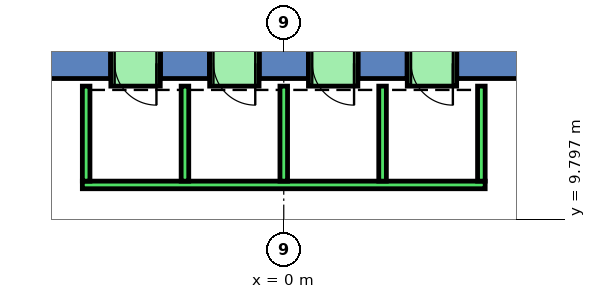
"""IFC4 building model, lengths in metres.
Left out: names, types, materials, properties, quantities, classifications, styles, units other than length and angle.
Written with IfcOpenShell. Run it as: python <this file> out.ifc"""

import sys

from ifc_helpers import new_model, si_unit, direction, frame, frame_2d, origin, place, context, subcontext, project, spatial, polyline, rectangle, outline, extrude, element, fill, save


model = new_model("IFC4")
c1 = context("Model", 3, precision=1e-05, world=origin(), true_north=direction((0.0, 1.0)))
c2 = subcontext(c1, "Body", "Model", "MODEL_VIEW")
j1 = project(units=[si_unit("LENGTHUNIT", "METRE"), si_unit("PLANEANGLEUNIT", "RADIAN")], contexts=[c1])
p1 = place(None, origin())
s1 = spatial("IfcSite", under=j1, at=p1, CompositionType="ELEMENT")
p2 = place(p1, origin())
s2 = spatial("IfcBuilding", under=s1, at=p2, CompositionType="ELEMENT")
p3 = place(p2, frame((0.0, 0.0, 15.0)))
s3 = spatial("IfcBuildingStorey", under=s2, at=p3, CompositionType="ELEMENT", Elevation=15.0)
p4 = place(p3, frame((0.0, 0.0, -0.45)))
e1 = element("IfcWall", 1, at=p4, inside=s3, PredefinedType="SHEAR", context=c2, shape_type="SweptSolid", body=[
    extrude(outline(polyline([(4.55, 14.5), (4.55, 13.5), (6.351, 13.5), (6.928, 14.5), (4.55, 14.5)])), origin(), (0.0, 0.0, 1.0), 5.0),
])
p5 = place(p3, frame((0.0, 0.0, -0.45)))
e2 = element("IfcWall", 2, at=p5, inside=s3, PredefinedType="SHEAR", context=c2, shape_type="SweptSolid", body=[
    extrude(outline(polyline([(1.95, 14.5), (1.95, 13.5), (3.25, 13.5), (3.25, 14.5), (1.95, 14.5)])), origin(), (0.0, 0.0, 1.0), 5.0),
])
p6 = place(p3, frame((0.0, 0.0, -0.45)))
e3 = element("IfcWall", 3, at=p6, inside=s3, PredefinedType="SHEAR", context=c2, shape_type="SweptSolid", body=[
    extrude(outline(polyline([(-0.65, 14.5), (-0.65, 13.5), (0.65, 13.5), (0.65, 14.5), (-0.65, 14.5)])), origin(), (0.0, 0.0, 1.0), 5.0),
])
p7 = place(p3, frame((0.0, 0.0, -0.45)))
e4 = element("IfcWall", 4, at=p7, inside=s3, PredefinedType="SHEAR", context=c2, shape_type="SweptSolid", body=[
    extrude(outline(polyline([(-3.25, 14.5), (-3.25, 13.5), (-1.95, 13.5), (-1.95, 14.5), (-3.25, 14.5)])), origin(), (0.0, 0.0, 1.0), 5.0),
])
p8 = place(p3, frame((0.0, 0.0, -0.45)))
e5 = element("IfcWall", 5, at=p8, inside=s3, PredefinedType="SHEAR", context=c2, shape_type="SweptSolid", body=[
    extrude(outline(polyline([(-4.55, 13.5), (-4.55, 14.5), (-6.928, 14.5), (-6.351, 13.5), (-4.55, 13.5)])), origin(), (0.0, 0.0, 1.0), 5.0),
])
p9 = place(p3, frame((0.0, 0.0, 3.6)))
e6 = element("IfcWall", 6, at=p9, inside=s3, PredefinedType="SHEAR", context=c2, shape_type="SweptSolid", body=[
    extrude(outline(polyline([(3.25, 14.5), (3.25, 13.5), (4.55, 13.5), (4.55, 14.5), (3.25, 14.5)])), origin(), (0.0, 0.0, 1.0), 0.95),
])
p10 = place(p3, frame((0.0, 0.0, 3.6)))
e7 = element("IfcWall", 7, at=p10, inside=s3, PredefinedType="SHEAR", context=c2, shape_type="SweptSolid", body=[
    extrude(outline(polyline([(0.65, 14.5), (0.65, 13.5), (1.95, 13.5), (1.95, 14.5), (0.65, 14.5)])), origin(), (0.0, 0.0, 1.0), 0.95),
])
p11 = place(p3, frame((0.0, 0.0, 3.6)))
e8 = element("IfcWall", 8, at=p11, inside=s3, PredefinedType="SHEAR", context=c2, shape_type="SweptSolid", body=[
    extrude(outline(polyline([(-1.95, 14.5), (-1.95, 13.5), (-0.65, 13.5), (-0.65, 14.5), (-1.95, 14.5)])), origin(), (0.0, 0.0, 1.0), 0.95),
])
p12 = place(p3, frame((0.0, 0.0, 3.6)))
e9 = element("IfcWall", 9, at=p12, inside=s3, PredefinedType="SHEAR", context=c2, shape_type="SweptSolid", body=[
    extrude(outline(polyline([(-4.55, 14.5), (-4.55, 13.5), (-3.25, 13.5), (-3.25, 14.5), (-4.55, 14.5)])), origin(), (0.0, 0.0, 1.0), 0.95),
])
p13 = place(p3, frame((5.3, 10.7, 0.0), z_axis=(0.0, 0.0, 1.0), x_axis=(-1.0, 0.0, 0.0)))
e10 = element("IfcWall", 10, at=p13, inside=s3, PredefinedType="STANDARD", context=c2, shape_type="SweptSolid", body=[
    extrude(rectangle(XDim=10.6, YDim=0.2, at=frame_2d((5.3, 0.0))), origin(), (0.0, 0.0, 1.0), 4.55),
])
for number, where, z_axis, x_axis in (
    (11, (5.2, 10.8, 0.0), (0.0, 0.0, 1.0), (0.0, 1.0, 0.0)),
    (12, (2.6, 10.8, 0.0), (0.0, 0.0, 1.0), (0.0, 1.0, 0.0)),
    (13, (0.0, 10.8, 0.0), (0.0, 0.0, 1.0), (0.0, 1.0, 0.0)),
    (14, (-2.6, 10.8, 0.0), (0.0, 0.0, 1.0), (0.0, 1.0, 0.0)),
    (15, (-5.2, 10.8, 0.0), (0.0, 0.0, 1.0), (0.0, 1.0, 0.0)),
):
    element("IfcWall", number, at=place(p3, frame(where, z_axis=z_axis, x_axis=x_axis)), inside=s3, PredefinedType="STANDARD", context=c2, shape_type="SweptSolid", body=[
        extrude(rectangle(XDim=2.5, YDim=0.2, at=frame_2d((1.25, 0.0))), origin(), (0.0, 0.0, 1.0), 4.55),
    ])
p14 = place(p3, frame((4.55, 13.9, 0.0), z_axis=(0.0, 0.0, 1.0), x_axis=(-1.0, 0.0, 0.0)))
e16 = element("IfcWall", 16, at=p14, inside=s3, PredefinedType="STANDARD", context=c2, shape_type="SweptSolid", body=[
    extrude(rectangle(XDim=1.3, YDim=1.2, at=frame_2d((0.65, 0.0))), origin(), (0.0, 0.0, 1.0), 2.4),
])
p15 = place(p14, frame((0.1, 0.0, 0.0)))
e17 = element("IfcOpeningElement", 17, at=p15, cuts=e16, PredefinedType="OPENING", context=c2, shape_type="SweptSolid", body=[
    extrude(rectangle(XDim=1.1, YDim=2.3, at=frame_2d((0.55, 1.15))), frame((0.0, 0.61, 0.0), z_axis=(0.0, -1.0, 0.0), x_axis=(1.0, 0.0, 0.0)), (0.0, 0.0, 1.0), 1.22),
])
p16 = place(p3, frame((1.95, 13.9, 0.0), z_axis=(0.0, 0.0, 1.0), x_axis=(-1.0, 0.0, 0.0)))
e18 = element("IfcWall", 18, at=p16, inside=s3, PredefinedType="STANDARD", context=c2, shape_type="SweptSolid", body=[
    extrude(rectangle(XDim=1.3, YDim=1.2, at=frame_2d((0.65, 0.0))), origin(), (0.0, 0.0, 1.0), 2.4),
])
p17 = place(p16, frame((0.1, 0.0, 0.0)))
e19 = element("IfcOpeningElement", 19, at=p17, cuts=e18, PredefinedType="OPENING", context=c2, shape_type="SweptSolid", body=[
    extrude(rectangle(XDim=1.1, YDim=2.3, at=frame_2d((0.55, 1.15))), frame((0.0, 0.61, 0.0), z_axis=(0.0, -1.0, 0.0), x_axis=(1.0, 0.0, 0.0)), (0.0, 0.0, 1.0), 1.22),
])
p18 = place(p3, frame((-0.65, 13.9, 0.0), z_axis=(0.0, 0.0, 1.0), x_axis=(-1.0, 0.0, 0.0)))
e20 = element("IfcWall", 20, at=p18, inside=s3, PredefinedType="STANDARD", context=c2, shape_type="SweptSolid", body=[
    extrude(rectangle(XDim=1.3, YDim=1.2, at=frame_2d((0.65, 0.0))), origin(), (0.0, 0.0, 1.0), 2.4),
])
p19 = place(p18, frame((0.1, 0.0, 0.0)))
e21 = element("IfcOpeningElement", 21, at=p19, cuts=e20, PredefinedType="OPENING", context=c2, shape_type="SweptSolid", body=[
    extrude(rectangle(XDim=1.1, YDim=2.3, at=frame_2d((0.55, 1.15))), frame((0.0, 0.61, 0.0), z_axis=(0.0, -1.0, 0.0), x_axis=(1.0, 0.0, 0.0)), (0.0, 0.0, 1.0), 1.22),
])
p20 = place(p3, frame((-3.25, 13.9, 0.0), z_axis=(0.0, 0.0, 1.0), x_axis=(-1.0, 0.0, 0.0)))
e22 = element("IfcWall", 22, at=p20, inside=s3, PredefinedType="STANDARD", context=c2, shape_type="SweptSolid", body=[
    extrude(rectangle(XDim=1.3, YDim=1.2, at=frame_2d((0.65, 0.0))), origin(), (0.0, 0.0, 1.0), 2.4),
])
p21 = place(p20, frame((0.1, 0.0, 0.0)))
e23 = element("IfcOpeningElement", 23, at=p21, cuts=e22, PredefinedType="OPENING", context=c2, shape_type="SweptSolid", body=[
    extrude(rectangle(XDim=1.1, YDim=2.3, at=frame_2d((0.55, 1.15))), frame((0.0, 0.61, 0.0), z_axis=(0.0, -1.0, 0.0), x_axis=(1.0, 0.0, 0.0)), (0.0, 0.0, 1.0), 1.22),
])
p22 = place(p15, origin())
e24 = element("IfcDoor", 24, at=p22, inside=s3, OperationType="SLIDING_TO_LEFT", PredefinedType="DOOR", context=c2, shape_type="SweptSolid", body=[
    extrude(rectangle(XDim=1.1, YDim=2.3, at=frame_2d((0.55, 1.15))), frame((0.0, 0.025, 0.0), z_axis=(0.0, -1.0, 0.0), x_axis=(1.0, 0.0, 0.0)), (0.0, 0.0, 1.0), 0.05),
])
fill(e17, e24)
p23 = place(p17, origin())
e25 = element("IfcDoor", 25, at=p23, inside=s3, OperationType="SLIDING_TO_LEFT", PredefinedType="DOOR", context=c2, shape_type="SweptSolid", body=[
    extrude(rectangle(XDim=1.1, YDim=2.3, at=frame_2d((0.55, 1.15))), frame((0.0, 0.025, 0.0), z_axis=(0.0, -1.0, 0.0), x_axis=(1.0, 0.0, 0.0)), (0.0, 0.0, 1.0), 0.05),
])
fill(e19, e25)
p24 = place(p19, origin())
e26 = element("IfcDoor", 26, at=p24, inside=s3, OperationType="SLIDING_TO_LEFT", PredefinedType="DOOR", context=c2, shape_type="SweptSolid", body=[
    extrude(rectangle(XDim=1.1, YDim=2.3, at=frame_2d((0.55, 1.15))), frame((0.0, 0.025, 0.0), z_axis=(0.0, -1.0, 0.0), x_axis=(1.0, 0.0, 0.0)), (0.0, 0.0, 1.0), 0.05),
])
fill(e21, e26)
p25 = place(p21, origin())
e27 = element("IfcDoor", 27, at=p25, inside=s3, OperationType="SLIDING_TO_LEFT", PredefinedType="DOOR", context=c2, shape_type="SweptSolid", body=[
    extrude(rectangle(XDim=1.1, YDim=2.3, at=frame_2d((0.55, 1.15))), frame((0.0, 0.025, 0.0), z_axis=(0.0, -1.0, 0.0), x_axis=(1.0, 0.0, 0.0)), (0.0, 0.0, 1.0), 0.05),
])
fill(e23, e27)
save(model, sys.argv[1])
